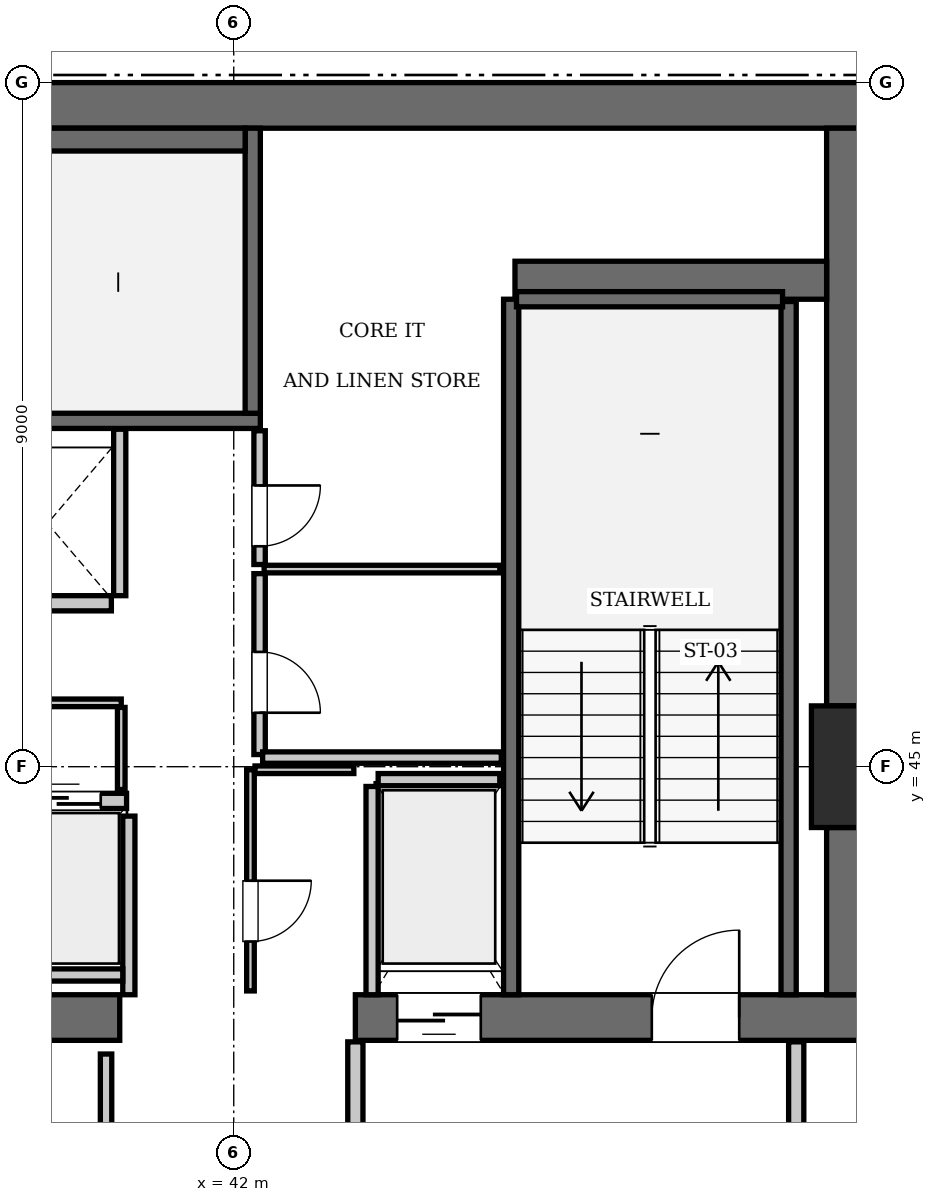
"""IFC4 building model, lengths in metres.
Left out: names, types, materials, properties, quantities, classifications, styles, units other than length and angle.
Written with IfcOpenShell. Run it as: python <this file> out.ifc"""

import sys

from ifc_helpers import new_model, si_unit, direction, frame, frame_2d, origin, origin_2d, place, context, subcontext, project, spatial, rectangle, extrude, element, fill, save


model = new_model("IFC4")
c1 = context("Model", 3, precision=1e-05, world=origin(), true_north=direction((0.0, 1.0)))
c2 = subcontext(c1, "Body", "Model", "MODEL_VIEW")
j1 = project(units=[si_unit("LENGTHUNIT", "METRE"), si_unit("PLANEANGLEUNIT", "RADIAN")], contexts=[c1])
p1 = place(None, origin())
s1 = spatial("IfcSite", under=j1, at=p1, CompositionType="ELEMENT")
p2 = place(p1, origin())
s2 = spatial("IfcBuilding", under=s1, at=p2, CompositionType="ELEMENT")
p3 = place(p2, frame((0.0, 0.0, 289.45)))
s3 = spatial("IfcBuildingStorey", under=s2, at=p3, CompositionType="ELEMENT", Elevation=289.45)
p4 = place(p3, frame((50.4, 45.0, 0.0), z_axis=(0.0, 0.0, 1.0), x_axis=(1.0, 0.0, 0.0)))
e1 = element("IfcColumn", 1, at=p4, inside=s3, PredefinedType="COLUMN", context=c2, shape_type="SweptSolid", body=[
    extrude(rectangle(XDim=1.6, YDim=1.6, at=origin_2d()), origin(), (0.0, 0.0, 1.0), 3.85),
])
p5 = place(p3, frame((25.2, 53.7, 0.0), z_axis=(0.0, 0.0, 1.0), x_axis=(1.0, 0.0, 0.0)))
e2 = element("IfcWall", 2, at=p5, inside=s3, PredefinedType="SHEAR", context=c2, shape_type="SweptSolid", body=[
    extrude(rectangle(XDim=25.2, YDim=0.6, at=frame_2d((12.6, 0.0))), origin(), (0.0, 0.0, 1.0), 3.85),
])
p6 = place(p3, frame((35.1, 41.7, 0.0), z_axis=(0.0, 0.0, 1.0), x_axis=(1.0, 0.0, 0.0)))
e3 = element("IfcWall", 3, at=p6, inside=s3, PredefinedType="SHEAR", context=c2, shape_type="SweptSolid", body=[
    extrude(rectangle(XDim=5.4, YDim=0.6, at=frame_2d((2.7, 0.0))), origin(), (0.0, 0.0, 1.0), 3.85),
])
p7 = place(p3, frame((43.6, 41.7, 0.0), z_axis=(0.0, 0.0, 1.0), x_axis=(1.0, 0.0, 0.0)))
e4 = element("IfcWall", 4, at=p7, inside=s3, PredefinedType="SHEAR", context=c2, shape_type="SweptSolid", body=[
    extrude(rectangle(XDim=6.8, YDim=0.6, at=frame_2d((3.4, 0.0))), origin(), (0.0, 0.0, 1.0), 3.85),
])
p8 = place(p7, frame((3.9, 0.0, 0.0)))
e5 = element("IfcOpeningElement", 5, at=p8, cuts=e4, PredefinedType="OPENING", context=c2, shape_type="SweptSolid", body=[
    extrude(rectangle(XDim=1.15, YDim=2.15, at=frame_2d((0.575, 1.075))), frame((0.0, 0.31, 0.0), z_axis=(0.0, -1.0, 0.0), x_axis=(1.0, 0.0, 0.0)), (0.0, 0.0, 1.0), 0.62),
])
p9 = place(p7, frame((0.55, 0.0, 0.0)))
e6 = element("IfcOpeningElement", 6, at=p9, cuts=e4, PredefinedType="OPENING", context=c2, shape_type="SweptSolid", body=[
    extrude(rectangle(XDim=1.1, YDim=2.2, at=frame_2d((0.55, 1.1))), frame((0.0, 0.31, 0.0), z_axis=(0.0, -1.0, 0.0), x_axis=(1.0, 0.0, 0.0)), (0.0, 0.0, 1.0), 0.62),
])
p10 = place(p3, frame((50.1, 42.0, 0.0), z_axis=(0.0, 0.0, 1.0), x_axis=(0.0, 1.0, 0.0)))
e7 = element("IfcWall", 7, at=p10, inside=s3, PredefinedType="SHEAR", context=c2, shape_type="SweptSolid", body=[
    extrude(rectangle(XDim=2.2, YDim=0.6, at=frame_2d((1.1, 0.0))), origin(), (0.0, 0.0, 1.0), 3.85),
])
p11 = place(p3, frame((50.1, 45.8, 0.0), z_axis=(0.0, 0.0, 1.0), x_axis=(0.0, 1.0, 0.0)))
e8 = element("IfcWall", 8, at=p11, inside=s3, PredefinedType="SHEAR", context=c2, shape_type="SweptSolid", body=[
    extrude(rectangle(XDim=7.6, YDim=0.6, at=frame_2d((3.8, 0.0))), origin(), (0.0, 0.0, 1.0), 3.85),
])
p12 = place(p3, frame((45.7, 51.4, 0.0), z_axis=(0.0, 0.0, 1.0), x_axis=(1.0, 0.0, 0.0)))
e9 = element("IfcWall", 9, at=p12, inside=s3, PredefinedType="SHEAR", context=c2, shape_type="SweptSolid", body=[
    extrude(rectangle(XDim=4.1, YDim=0.5, at=frame_2d((2.05, 0.0))), origin(), (0.0, 0.0, 1.0), 3.85),
])
p13 = place(p3, frame((33.25, 49.55, 0.0), z_axis=(0.0, 0.0, 1.0), x_axis=(1.0, 0.0, 0.0)))
e10 = element("IfcWall", 10, at=p13, inside=s3, PredefinedType="SOLIDWALL", context=c2, shape_type="SweptSolid", body=[
    extrude(rectangle(XDim=9.1, YDim=0.2, at=frame_2d((4.55, 0.0))), origin(), (0.0, 0.0, 1.0), 3.61),
])
p14 = place(p3, frame((42.25, 49.65, 0.0), z_axis=(0.0, 0.0, 1.0), x_axis=(0.0, 1.0, 0.0)))
e11 = element("IfcWall", 11, at=p14, inside=s3, PredefinedType="SOLIDWALL", context=c2, shape_type="SweptSolid", body=[
    extrude(rectangle(XDim=3.75, YDim=0.2, at=frame_2d((1.875, 0.0))), origin(), (0.0, 0.0, 1.0), 3.61),
])
p15 = place(p3, frame((33.45, 53.25, 0.0), z_axis=(0.0, 0.0, 1.0), x_axis=(1.0, 0.0, 0.0)))
e12 = element("IfcWall", 12, at=p15, inside=s3, PredefinedType="SOLIDWALL", context=c2, shape_type="SweptSolid", body=[
    extrude(rectangle(XDim=8.7, YDim=0.3, at=frame_2d((4.35, 0.0))), origin(), (0.0, 0.0, 1.0), 3.61),
])
p16 = place(p3, frame((45.65, 42.0, 0.0), z_axis=(0.0, 0.0, 1.0), x_axis=(0.0, 1.0, 0.0)))
e13 = element("IfcWall", 13, at=p16, inside=s3, PredefinedType="SOLIDWALL", context=c2, shape_type="SweptSolid", body=[
    extrude(rectangle(XDim=9.15, YDim=0.2, at=frame_2d((4.575, 0.0))), origin(), (0.0, 0.0, 1.0), 3.61),
])
p17 = place(p3, frame((49.3, 42.0, 0.0), z_axis=(0.0, 0.0, 1.0), x_axis=(0.0, 1.0, 0.0)))
e14 = element("IfcWall", 14, at=p17, inside=s3, PredefinedType="SOLIDWALL", context=c2, shape_type="SweptSolid", body=[
    extrude(rectangle(XDim=9.12, YDim=0.2, at=frame_2d((4.56, 0.0))), origin(), (0.0, 0.0, 1.0), 3.61),
])
p18 = place(p3, frame((45.72, 51.15, 0.0), z_axis=(0.0, 0.0, 1.0), x_axis=(1.0, 0.0, 0.0)))
e15 = element("IfcWall", 15, at=p18, inside=s3, PredefinedType="SOLIDWALL", context=c2, shape_type="SweptSolid", body=[
    extrude(rectangle(XDim=3.5, YDim=0.2, at=frame_2d((1.75, 0.0))), origin(), (0.0, 0.0, 1.0), 3.61),
])
p19 = place(p3, frame((38.91, 44.55, 0.0), z_axis=(0.0, 0.0, 1.0), x_axis=(1.0, 0.0, 0.0)))
e16 = element("IfcWall", 16, at=p19, inside=s3, PredefinedType="SOLIDWALL", context=c2, shape_type="SweptSolid", body=[
    extrude(rectangle(XDim=1.68, YDim=0.2, at=frame_2d((0.84, 0.0))), origin(), (0.0, 0.0, 1.0), 3.61),
])
p20 = place(p19, frame((0.34, 0.0, 0.0)))
e17 = element("IfcOpeningElement", 17, at=p20, cuts=e16, PredefinedType="OPENING", context=c2, shape_type="SweptSolid", body=[
    extrude(rectangle(XDim=1.0, YDim=2.15, at=frame_2d((0.5, 1.075))), frame((0.0, 0.11, 0.0), z_axis=(0.0, -1.0, 0.0), x_axis=(1.0, 0.0, 0.0)), (0.0, 0.0, 1.0), 0.22),
])
p21 = place(p3, frame((38.71, 47.15, 0.0), z_axis=(0.0, 0.0, 1.0), x_axis=(1.0, 0.0, 0.0)))
e18 = element("IfcWall", 18, at=p21, inside=s3, PredefinedType="SOLIDWALL", context=c2, shape_type="SweptSolid", body=[
    extrude(rectangle(XDim=1.68, YDim=0.2, at=frame_2d((0.84, 0.0))), origin(), (0.0, 0.0, 1.0), 3.61),
])
p22 = place(p3, frame((43.9, 44.83, 0.0), z_axis=(0.0, 0.0, 1.0), x_axis=(1.0, 0.0, 0.0)))
e19 = element("IfcWall", 19, at=p22, inside=s3, PredefinedType="SOLIDWALL", context=c2, shape_type="SweptSolid", body=[
    extrude(rectangle(XDim=1.6, YDim=0.16, at=frame_2d((0.8, 0.0))), origin(), (0.0, 0.0, 1.0), 3.61),
])
p23 = place(p3, frame((43.82, 42.0, 0.0), z_axis=(0.0, 0.0, 1.0), x_axis=(0.0, 1.0, 0.0)))
e20 = element("IfcWall", 20, at=p23, inside=s3, PredefinedType="SOLIDWALL", context=c2, shape_type="SweptSolid", body=[
    extrude(rectangle(XDim=2.74, YDim=0.16, at=frame_2d((1.37, 0.0))), origin(), (0.0, 0.0, 1.0), 3.61),
])
p24 = place(p3, frame((40.62, 42.0, 0.0), z_axis=(0.0, 0.0, 1.0), x_axis=(0.0, 1.0, 0.0)))
e21 = element("IfcWall", 21, at=p24, inside=s3, PredefinedType="SOLIDWALL", context=c2, shape_type="SweptSolid", body=[
    extrude(rectangle(XDim=2.35, YDim=0.16, at=frame_2d((1.175, 0.0))), origin(), (0.0, 0.0, 1.0), 3.61),
])
p25 = place(p3, frame((35.52, 42.26, 0.0), z_axis=(0.0, 0.0, 1.0), x_axis=(1.0, 0.0, 0.0)))
e22 = element("IfcWall", 22, at=p25, inside=s3, PredefinedType="SOLIDWALL", context=c2, shape_type="SweptSolid", body=[
    extrude(rectangle(XDim=5.02, YDim=0.16, at=frame_2d((2.51, 0.0))), origin(), (0.0, 0.0, 1.0), 3.61),
])
p26 = place(p3, frame((40.5, 47.25, 0.0), z_axis=(0.0, 0.0, 1.0), x_axis=(0.0, 1.0, 0.0)))
e23 = element("IfcWall", 23, at=p26, inside=s3, PredefinedType="SOLIDWALL", context=c2, shape_type="SweptSolid", body=[
    extrude(rectangle(XDim=2.19, YDim=0.16, at=frame_2d((1.095, 0.0))), origin(), (0.0, 0.0, 1.0), 3.61),
])
for number, where, z_axis, x_axis in (
    (24, (43.6, 38.31, 0.0), (0.0, 0.0, 1.0), (0.0, 1.0, 0.0)),
    (25, (49.4, 38.31, 0.0), (0.0, 0.0, 1.0), (0.0, 1.0, 0.0)),
):
    element("IfcWall", number, at=place(p3, frame(where, z_axis=z_axis, x_axis=x_axis)), inside=s3, PredefinedType="PARTITIONING", context=c2, shape_type="SweptSolid", body=[
        extrude(rectangle(XDim=3.07, YDim=0.2, at=frame_2d((1.535, 0.0))), origin(), (0.0, 0.0, 1.0), 3.61),
    ])
p27 = place(p3, frame((38.02, 45.84, 0.0), z_axis=(0.0, 0.0, 1.0), x_axis=(1.0, 0.0, 0.0)))
e26 = element("IfcWall", 26, at=p27, inside=s3, PredefinedType="PARTITIONING", context=c2, shape_type="SweptSolid", body=[
    extrude(rectangle(XDim=2.5, YDim=0.1, at=frame_2d((1.25, 0.0))), origin(), (0.0, 0.0, 1.0), 3.61),
])
p28 = place(p27, frame((0.75, 0.0, 0.0)))
e27 = element("IfcOpeningElement", 27, at=p28, cuts=e26, PredefinedType="OPENING", context=c2, shape_type="SweptSolid", body=[
    extrude(rectangle(XDim=0.8, YDim=2.05, at=frame_2d((0.4, 1.025))), frame((0.0, 0.06, 0.0), z_axis=(0.0, -1.0, 0.0), x_axis=(1.0, 0.0, 0.0)), (0.0, 0.0, 1.0), 0.12),
])
p29 = place(p3, frame((40.52, 44.7, 0.0), z_axis=(0.0, 0.0, 1.0), x_axis=(0.0, 1.0, 0.0)))
e28 = element("IfcWall", 28, at=p29, inside=s3, PredefinedType="PARTITIONING", context=c2, shape_type="SweptSolid", body=[
    extrude(rectangle(XDim=1.08, YDim=0.1, at=frame_2d((0.54, 0.0))), origin(), (0.0, 0.0, 1.0), 3.61),
])
p30 = place(p3, frame((42.22, 42.05, 0.0), z_axis=(0.0, 0.0, 1.0), x_axis=(0.0, 1.0, 0.0)))
e29 = element("IfcWall", 29, at=p30, inside=s3, PredefinedType="PARTITIONING", context=c2, shape_type="SweptSolid", body=[
    extrude(rectangle(XDim=2.91, YDim=0.1, at=frame_2d((1.455, 0.0))), origin(), (0.0, 0.0, 1.0), 3.61),
])
p31 = place(p30, frame((0.65, 0.0, 0.0)))
e30 = element("IfcOpeningElement", 30, at=p31, cuts=e29, PredefinedType="OPENING", context=c2, shape_type="SweptSolid", body=[
    extrude(rectangle(XDim=0.8, YDim=2.05, at=frame_2d((0.4, 1.025))), frame((0.0, 0.06, 0.0), z_axis=(0.0, -1.0, 0.0), x_axis=(1.0, 0.0, 0.0)), (0.0, 0.0, 1.0), 0.12),
])
p32 = place(p3, frame((42.28, 44.96, 0.0), z_axis=(0.0, 0.0, 1.0), x_axis=(1.0, 0.0, 0.0)))
e31 = element("IfcWall", 31, at=p32, inside=s3, PredefinedType="PARTITIONING", context=c2, shape_type="SweptSolid", body=[
    extrude(rectangle(XDim=1.3, YDim=0.1, at=frame_2d((0.65, 0.0))), origin(), (0.0, 0.0, 1.0), 3.61),
])
p33 = place(p3, frame((42.34, 45.16, 0.0), z_axis=(0.0, 0.0, 1.0), x_axis=(0.0, 1.0, 0.0)))
e32 = element("IfcWall", 32, at=p33, inside=s3, PredefinedType="PARTITIONING", context=c2, shape_type="SweptSolid", body=[
    extrude(rectangle(XDim=2.38, YDim=0.15, at=frame_2d((1.19, 0.0))), origin(), (0.0, 0.0, 1.0), 3.61),
])
p34 = place(p33, frame((0.55, 0.0, 0.0)))
e33 = element("IfcOpeningElement", 33, at=p34, cuts=e32, PredefinedType="OPENING", context=c2, shape_type="SweptSolid", body=[
    extrude(rectangle(XDim=0.8, YDim=2.05, at=frame_2d((0.4, 1.025))), frame((0.0, 0.085, 0.0), z_axis=(0.0, -1.0, 0.0), x_axis=(1.0, 0.0, 0.0)), (0.0, 0.0, 1.0), 0.17),
])
p35 = place(p3, frame((42.34, 47.66, 0.0), z_axis=(0.0, 0.0, 1.0), x_axis=(0.0, 1.0, 0.0)))
e34 = element("IfcWall", 34, at=p35, inside=s3, PredefinedType="PARTITIONING", context=c2, shape_type="SweptSolid", body=[
    extrude(rectangle(XDim=1.76, YDim=0.15, at=frame_2d((0.88, 0.0))), origin(), (0.0, 0.0, 1.0), 3.61),
])
p36 = place(p35, frame((0.24, 0.0, 0.0)))
e35 = element("IfcOpeningElement", 35, at=p36, cuts=e34, PredefinedType="OPENING", context=c2, shape_type="SweptSolid", body=[
    extrude(rectangle(XDim=0.8, YDim=2.05, at=frame_2d((0.4, 1.025))), frame((0.0, 0.085, 0.0), z_axis=(0.0, -1.0, 0.0), x_axis=(1.0, 0.0, 0.0)), (0.0, 0.0, 1.0), 0.17),
])
p37 = place(p3, frame((42.4, 47.6, 0.0), z_axis=(0.0, 0.0, 1.0), x_axis=(1.0, 0.0, 0.0)))
e36 = element("IfcWall", 36, at=p37, inside=s3, PredefinedType="PARTITIONING", context=c2, shape_type="SweptSolid", body=[
    extrude(rectangle(XDim=3.1, YDim=0.1, at=frame_2d((1.55, 0.0))), origin(), (0.0, 0.0, 1.0), 3.61),
])
p38 = place(p3, frame((42.38, 45.12, 0.0), z_axis=(0.0, 0.0, 1.0), x_axis=(1.0, 0.0, 0.0)))
e37 = element("IfcWall", 37, at=p38, inside=s3, PredefinedType="PARTITIONING", context=c2, shape_type="SweptSolid", body=[
    extrude(rectangle(XDim=3.14, YDim=0.15, at=frame_2d((1.57, 0.0))), origin(), (0.0, 0.0, 1.0), 3.61),
])
p39 = place(p3, frame((40.32, 38.38, 0.0), z_axis=(0.0, 0.0, 1.0), x_axis=(0.0, 1.0, 0.0)))
e38 = element("IfcWall", 38, at=p39, inside=s3, PredefinedType="PARTITIONING", context=c2, shape_type="SweptSolid", body=[
    extrude(rectangle(XDim=2.84, YDim=0.15, at=frame_2d((1.42, 0.0))), origin(), (0.0, 0.0, 1.0), 3.61),
])
p40 = place(p8, origin())
e39 = element("IfcDoor", 39, at=p40, inside=s3, OperationType="SINGLE_SWING_RIGHT", PredefinedType="DOOR", context=c2, shape_type="SweptSolid", body=[
    extrude(rectangle(XDim=1.15, YDim=2.15, at=frame_2d((0.575, 1.075))), frame((0.0, 0.025, 0.0), z_axis=(0.0, -1.0, 0.0), x_axis=(1.0, 0.0, 0.0)), (0.0, 0.0, 1.0), 0.05),
])
fill(e5, e39)
p41 = place(p20, origin())
e40 = element("IfcDoor", 40, at=p41, inside=s3, OperationType="SLIDING_TO_LEFT", PredefinedType="DOOR", context=c2, shape_type="SweptSolid", body=[
    extrude(rectangle(XDim=1.0, YDim=2.15, at=frame_2d((0.5, 1.075))), frame((0.0, 0.025, 0.0), z_axis=(0.0, -1.0, 0.0), x_axis=(1.0, 0.0, 0.0)), (0.0, 0.0, 1.0), 0.05),
])
fill(e17, e40)
p42 = place(p9, frame((1.1, 0.0, 0.0), z_axis=(0.0, 0.0, 1.0), x_axis=(-1.0, 0.0, 0.0)))
e41 = element("IfcDoor", 41, at=p42, inside=s3, OperationType="SLIDING_TO_LEFT", PredefinedType="DOOR", context=c2, shape_type="SweptSolid", body=[
    extrude(rectangle(XDim=1.1, YDim=2.2, at=frame_2d((0.55, 1.1))), frame((0.0, 0.025, 0.0), z_axis=(0.0, -1.0, 0.0), x_axis=(1.0, 0.0, 0.0)), (0.0, 0.0, 1.0), 0.05),
])
fill(e6, e41)
p43 = place(p31, frame((0.8, 0.0, 0.0), z_axis=(0.0, 0.0, 1.0), x_axis=(-1.0, 0.0, 0.0)))
e42 = element("IfcDoor", 42, at=p43, inside=s3, OperationType="SINGLE_SWING_LEFT", PredefinedType="DOOR", context=c2, shape_type="SweptSolid", body=[
    extrude(rectangle(XDim=0.8, YDim=2.05, at=frame_2d((0.4, 1.025))), frame((0.0, 0.025, 0.0), z_axis=(0.0, -1.0, 0.0), x_axis=(1.0, 0.0, 0.0)), (0.0, 0.0, 1.0), 0.05),
])
fill(e30, e42)
p44 = place(p34, frame((0.8, 0.0, 0.0), z_axis=(0.0, 0.0, 1.0), x_axis=(-1.0, 0.0, 0.0)))
e43 = element("IfcDoor", 43, at=p44, inside=s3, OperationType="SINGLE_SWING_RIGHT", PredefinedType="DOOR", context=c2, shape_type="SweptSolid", body=[
    extrude(rectangle(XDim=0.8, YDim=2.05, at=frame_2d((0.4, 1.025))), frame((0.0, 0.025, 0.0), z_axis=(0.0, -1.0, 0.0), x_axis=(1.0, 0.0, 0.0)), (0.0, 0.0, 1.0), 0.05),
])
fill(e33, e43)
p45 = place(p36, frame((0.8, 0.0, 0.0), z_axis=(0.0, 0.0, 1.0), x_axis=(-1.0, 0.0, 0.0)))
e44 = element("IfcDoor", 44, at=p45, inside=s3, OperationType="SINGLE_SWING_LEFT", PredefinedType="DOOR", context=c2, shape_type="SweptSolid", body=[
    extrude(rectangle(XDim=0.8, YDim=2.05, at=frame_2d((0.4, 1.025))), frame((0.0, 0.025, 0.0), z_axis=(0.0, -1.0, 0.0), x_axis=(1.0, 0.0, 0.0)), (0.0, 0.0, 1.0), 0.05),
])
fill(e35, e44)
save(model, sys.argv[1])
